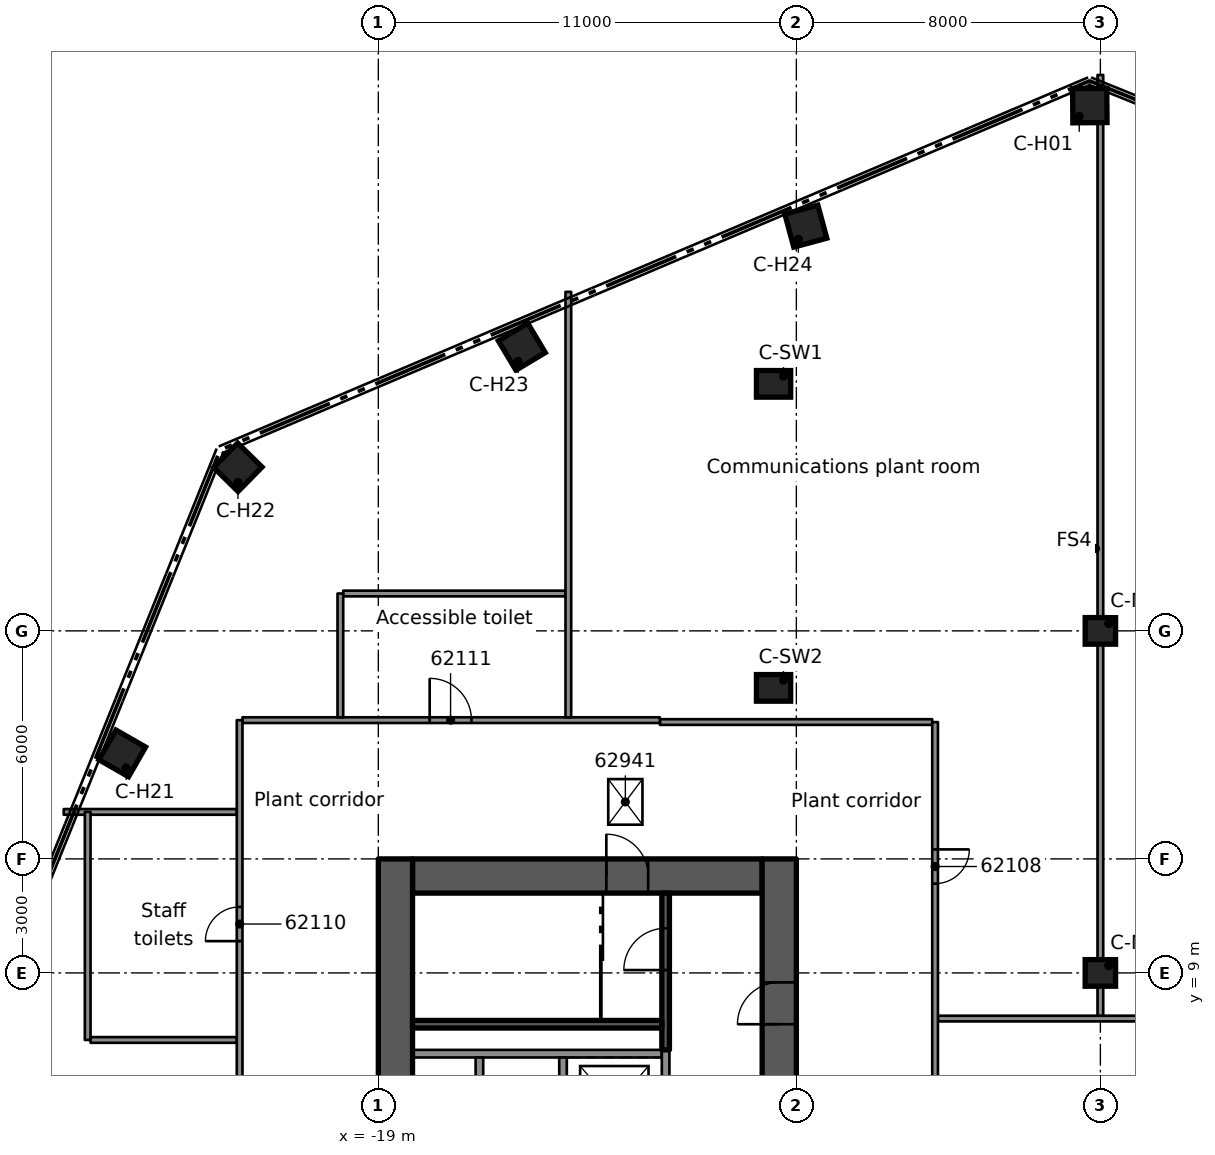
"""IFC4 building model, lengths in metres.
Left out: names, types, materials, properties, quantities, classifications, styles, units other than length and angle.
Written with IfcOpenShell. Run it as: python <this file> out.ifc"""

import sys

from ifc_helpers import new_model, si_unit, direction, frame, frame_2d, origin, origin_2d, place, context, subcontext, project, spatial, rectangle, extrude, element, fill, save


model = new_model("IFC4")
c1 = context("Model", 3, precision=1e-05, world=origin(), true_north=direction((0.0, 1.0)))
c2 = subcontext(c1, "Body", "Model", "MODEL_VIEW")
j1 = project(units=[si_unit("LENGTHUNIT", "METRE"), si_unit("PLANEANGLEUNIT", "RADIAN")], contexts=[c1])
p1 = place(None, origin())
s1 = spatial("IfcSite", under=j1, at=p1, CompositionType="ELEMENT")
p2 = place(p1, origin())
s2 = spatial("IfcBuilding", under=s1, at=p2, CompositionType="ELEMENT")
p3 = place(p2, frame((0.0, 0.0, 299.9)))
s3 = spatial("IfcBuildingStorey", under=s2, at=p3, CompositionType="ELEMENT", Elevation=299.9)
p4 = place(p3, frame((-18.1, 11.55, 0.0), z_axis=(0.0, 0.0, 1.0), x_axis=(1.0, 0.0, 0.0)))
e1 = element("IfcWall", 1, at=p4, inside=s3, PredefinedType="SHEAR", context=c2, shape_type="SweptSolid", body=[
    extrude(rectangle(XDim=9.2, YDim=0.9, at=frame_2d((4.6, 0.0))), origin(), (0.0, 0.0, 1.0), 4.4),
])
p5 = place(p4, frame((5.1, 0.0, 0.0)))
e2 = element("IfcOpeningElement", 2, at=p5, cuts=e1, PredefinedType="OPENING", context=c2, shape_type="SweptSolid", body=[
    extrude(rectangle(XDim=1.1, YDim=2.1, at=frame_2d((0.55, 1.05))), frame((0.0, 0.46, 0.0), z_axis=(0.0, -1.0, 0.0), x_axis=(1.0, 0.0, 0.0)), (0.0, 0.0, 1.0), 0.92),
])
p6 = place(p3, frame((-18.55, -12.0, 0.0), z_axis=(0.0, 0.0, 1.0), x_axis=(0.0, 1.0, 0.0)))
e3 = element("IfcWall", 3, at=p6, inside=s3, PredefinedType="SHEAR", context=c2, shape_type="SweptSolid", body=[
    extrude(rectangle(XDim=24.0, YDim=0.9, at=frame_2d((12.0, 0.0))), origin(), (0.0, 0.0, 1.0), 4.4),
])
p7 = place(p6, frame((5.9, 0.0, 0.0)))
e4 = element("IfcOpeningElement", 4, at=p7, cuts=e3, PredefinedType="OPENING", context=c2, shape_type="SweptSolid", body=[
    extrude(rectangle(XDim=1.8, YDim=2.1, at=frame_2d((0.9, 1.05))), frame((0.0, 0.46, 0.0), z_axis=(0.0, -1.0, 0.0), x_axis=(1.0, 0.0, 0.0)), (0.0, 0.0, 1.0), 0.92),
])
p8 = place(p6, frame((10.1, 0.0, 0.0)))
e5 = element("IfcOpeningElement", 5, at=p8, cuts=e3, PredefinedType="OPENING", context=c2, shape_type="SweptSolid", body=[
    extrude(rectangle(XDim=1.8, YDim=2.1, at=frame_2d((0.9, 1.05))), frame((0.0, 0.46, 0.0), z_axis=(0.0, -1.0, 0.0), x_axis=(1.0, 0.0, 0.0)), (0.0, 0.0, 1.0), 0.92),
])
p9 = place(p6, frame((14.3, 0.0, 0.0)))
e6 = element("IfcOpeningElement", 6, at=p9, cuts=e3, PredefinedType="OPENING", context=c2, shape_type="SweptSolid", body=[
    extrude(rectangle(XDim=1.8, YDim=2.1, at=frame_2d((0.9, 1.05))), frame((0.0, 0.46, 0.0), z_axis=(0.0, -1.0, 0.0), x_axis=(1.0, 0.0, 0.0)), (0.0, 0.0, 1.0), 0.92),
])
p10 = place(p3, frame((-8.45, -12.0, 0.0), z_axis=(0.0, 0.0, 1.0), x_axis=(0.0, 1.0, 0.0)))
e7 = element("IfcWall", 7, at=p10, inside=s3, PredefinedType="SHEAR", context=c2, shape_type="SweptSolid", body=[
    extrude(rectangle(XDim=24.0, YDim=0.9, at=frame_2d((12.0, 0.0))), origin(), (0.0, 0.0, 1.0), 4.4),
])
p11 = place(p10, frame((9.6, 0.0, 0.0)))
e8 = element("IfcOpeningElement", 8, at=p11, cuts=e7, PredefinedType="OPENING", context=c2, shape_type="SweptSolid", body=[
    extrude(rectangle(XDim=1.8, YDim=2.1, at=frame_2d((0.9, 1.05))), frame((0.0, 0.46, 0.0), z_axis=(0.0, -1.0, 0.0), x_axis=(1.0, 0.0, 0.0)), (0.0, 0.0, 1.0), 0.92),
])
p12 = place(p10, frame((5.9, 0.0, 0.0)))
e9 = element("IfcOpeningElement", 9, at=p12, cuts=e7, PredefinedType="OPENING", context=c2, shape_type="SweptSolid", body=[
    extrude(rectangle(XDim=1.8, YDim=2.1, at=frame_2d((0.9, 1.05))), frame((0.0, 0.46, 0.0), z_axis=(0.0, -1.0, 0.0), x_axis=(1.0, 0.0, 0.0)), (0.0, 0.0, 1.0), 0.92),
])
p13 = place(p10, frame((12.6, 0.0, 0.0)))
e10 = element("IfcOpeningElement", 10, at=p13, cuts=e7, PredefinedType="OPENING", context=c2, shape_type="SweptSolid", body=[
    extrude(rectangle(XDim=1.8, YDim=2.1, at=frame_2d((0.9, 1.05))), frame((0.0, 0.46, 0.0), z_axis=(0.0, -1.0, 0.0), x_axis=(1.0, 0.0, 0.0)), (0.0, 0.0, 1.0), 0.92),
])
p14 = place(p10, frame((19.65, 0.0, 0.0)))
e11 = element("IfcOpeningElement", 11, at=p14, cuts=e7, PredefinedType="OPENING", context=c2, shape_type="SweptSolid", body=[
    extrude(rectangle(XDim=1.1, YDim=2.1, at=frame_2d((0.55, 1.05))), frame((0.0, 0.46, 0.0), z_axis=(0.0, -1.0, 0.0), x_axis=(1.0, 0.0, 0.0)), (0.0, 0.0, 1.0), 0.92),
])
for number, where, z_axis, x_axis in (
    (12, (-0.278, 31.821, 0.0), (0.0, 0.0, 1.0), (-0.009, 1.0, 0.0)),
    (13, (-25.739, 14.777, 0.0), (0.0, 0.0, 1.0), (-0.867, 0.498, 0.0)),
    (14, (-22.697, 22.305, 0.0), (0.0, 0.0, 1.0), (-0.713, 0.701, 0.0)),
    (15, (-15.224, 25.477, 0.0), (0.0, 0.0, 1.0), (-0.513, 0.858, 0.0)),
    (16, (-7.751, 28.649, 0.0), (0.0, 0.0, 1.0), (-0.261, 0.965, 0.0)),
):
    element("IfcColumn", number, at=place(p3, frame(where, z_axis=z_axis, x_axis=x_axis)), inside=s3, PredefinedType="COLUMN", context=c2, shape_type="SweptSolid", body=[
        extrude(rectangle(XDim=0.9, YDim=0.9, at=origin_2d()), origin(), (0.0, 0.0, 1.0), 4.4),
    ])
for number, where, z_axis, x_axis in (
    (17, (0.0, 9.0, 0.0), (0.0, 0.0, 1.0), (1.0, 0.0, 0.0)),
    (18, (0.0, 18.0, 0.0), (0.0, 0.0, 1.0), (1.0, 0.0, 0.0)),
):
    element("IfcColumn", number, at=place(p3, frame(where, z_axis=z_axis, x_axis=x_axis)), inside=s3, PredefinedType="COLUMN", context=c2, shape_type="SweptSolid", body=[
        extrude(rectangle(XDim=0.8, YDim=0.7, at=origin_2d()), origin(), (0.0, 0.0, 1.0), 4.4),
    ])
for number, where, z_axis, x_axis in (
    (19, (-8.6, 24.5, 0.0), (0.0, 0.0, 1.0), (1.0, 0.0, 0.0)),
    (20, (-8.6, 16.5, 0.0), (0.0, 0.0, 1.0), (1.0, 0.0, 0.0)),
):
    element("IfcColumn", number, at=place(p3, frame(where, z_axis=z_axis, x_axis=x_axis)), inside=s3, PredefinedType="COLUMN", context=c2, shape_type="SweptSolid", body=[
        extrude(rectangle(XDim=0.9, YDim=0.7, at=origin_2d()), origin(), (0.0, 0.0, 1.0), 4.4),
    ])
p15 = place(p3, frame((-11.54, 6.875, 0.0), z_axis=(0.0, 0.0, 1.0), x_axis=(-1.0, 0.0, 0.0)))
e21 = element("IfcWall", 21, at=p15, inside=s3, PredefinedType="SOLIDWALL", context=c2, shape_type="SweptSolid", body=[
    extrude(rectangle(XDim=6.56, YDim=0.2, at=frame_2d((3.28, 0.0))), origin(), (0.0, 0.0, 1.0), 3.98),
])
p16 = place(p3, frame((-11.44, -6.975, 0.0), z_axis=(0.0, 0.0, 1.0), x_axis=(0.0, 1.0, 0.0)))
e22 = element("IfcWall", 22, at=p16, inside=s3, PredefinedType="SOLIDWALL", context=c2, shape_type="SweptSolid", body=[
    extrude(rectangle(XDim=13.95, YDim=0.2, at=frame_2d((6.975, 0.0))), origin(), (0.0, 0.0, 1.0), 3.98),
])
p17 = place(p16, frame((11.925, 0.0, 0.0)))
e23 = element("IfcOpeningElement", 23, at=p17, cuts=e22, PredefinedType="OPENING", context=c2, shape_type="SweptSolid", body=[
    extrude(rectangle(XDim=1.1, YDim=2.1, at=frame_2d((0.55, 1.05))), frame((0.0, 0.11, 0.0), z_axis=(0.0, -1.0, 0.0), x_axis=(1.0, 0.0, 0.0)), (0.0, 0.0, 1.0), 0.22),
])
p18 = place(p16, frame((1.075, 0.0, 0.0)))
e24 = element("IfcOpeningElement", 24, at=p18, cuts=e22, PredefinedType="OPENING", context=c2, shape_type="SweptSolid", body=[
    extrude(rectangle(XDim=0.8, YDim=2.1, at=frame_2d((0.4, 1.05))), frame((0.0, 0.11, 0.0), z_axis=(0.0, -1.0, 0.0), x_axis=(1.0, 0.0, 0.0)), (0.0, 0.0, 1.0), 0.22),
])
p19 = place(p16, frame((9.325, 0.0, 0.0)))
e25 = element("IfcOpeningElement", 25, at=p19, cuts=e22, PredefinedType="OPENING", context=c2, shape_type="SweptSolid", body=[
    extrude(rectangle(XDim=0.8, YDim=2.1, at=frame_2d((0.4, 1.05))), frame((0.0, 0.11, 0.0), z_axis=(0.0, -1.0, 0.0), x_axis=(1.0, 0.0, 0.0)), (0.0, 0.0, 1.0), 0.22),
])
for number, where, z_axis, x_axis in (
    (26, (-14.14, 4.025, 0.0), (0.0, 0.0, 1.0), (0.0, 1.0, 0.0)),
    (27, (-16.34, 4.025, 0.0), (0.0, 0.0, 1.0), (0.0, 1.0, 0.0)),
):
    element("IfcWall", number, at=place(p3, frame(where, z_axis=z_axis, x_axis=x_axis)), inside=s3, PredefinedType="SOLIDWALL", context=c2, shape_type="SweptSolid", body=[
        extrude(rectangle(XDim=2.75, YDim=0.2, at=frame_2d((1.375, 0.0))), origin(), (0.0, 0.0, 1.0), 3.98),
    ])
p20 = place(p3, frame((-11.44, 6.975, 0.0), z_axis=(0.0, 0.0, 1.0), x_axis=(0.0, 1.0, 0.0)))
e28 = element("IfcWall", 28, at=p20, inside=s3, PredefinedType="SOLIDWALL", context=c2, shape_type="SweptSolid", body=[
    extrude(rectangle(XDim=4.125, YDim=0.2, at=frame_2d((2.062, 0.0))), origin(), (0.0, 0.0, 1.0), 3.98),
])
p21 = place(p20, frame((2.1, 0.0, 0.0)))
e29 = element("IfcOpeningElement", 29, at=p21, cuts=e28, PredefinedType="OPENING", context=c2, shape_type="SweptSolid", body=[
    extrude(rectangle(XDim=1.1, YDim=2.1, at=frame_2d((0.55, 1.05))), frame((0.0, 0.11, 0.0), z_axis=(0.0, -1.0, 0.0), x_axis=(1.0, 0.0, 0.0)), (0.0, 0.0, 1.0), 0.22),
])
p22 = place(p3, frame((-11.54, 7.65, 0.0), z_axis=(0.0, 0.0, 1.0), x_axis=(-1.0, 0.0, 0.0)))
e30 = element("IfcWall", 30, at=p22, inside=s3, PredefinedType="SOLIDWALL", context=c2, shape_type="SweptSolid", body=[
    extrude(rectangle(XDim=6.56, YDim=0.2, at=frame_2d((3.28, 0.0))), origin(), (0.0, 0.0, 1.0), 3.98),
])
p23 = place(p3, frame((-26.573, 7.236, 0.0), z_axis=(0.0, 0.0, 1.0), x_axis=(1.0, 0.0, 0.0)))
e31 = element("IfcWall", 31, at=p23, inside=s3, PredefinedType="PARTITIONING", context=c2, shape_type="SweptSolid", body=[
    extrude(rectangle(XDim=3.848, YDim=0.15, at=frame_2d((1.924, 0.0))), origin(), (0.0, 0.0, 1.0), 3.98),
])
p24 = place(p3, frame((-4.274, 7.799, 0.0), z_axis=(0.0, 0.0, 1.0), x_axis=(1.0, 0.0, 0.0)))
e32 = element("IfcWall", 32, at=p24, inside=s3, PredefinedType="PARTITIONING", context=c2, shape_type="SweptSolid", body=[
    extrude(rectangle(XDim=8.549, YDim=0.15, at=frame_2d((4.274, 0.0))), origin(), (0.0, 0.0, 1.0), 3.98),
])
p25 = place(p3, frame((-27.278, 13.237, 0.0), z_axis=(0.0, 0.0, 1.0), x_axis=(1.0, 0.0, 0.0)))
e33 = element("IfcWall", 33, at=p25, inside=s3, PredefinedType="PARTITIONING", context=c2, shape_type="SweptSolid", body=[
    extrude(rectangle(XDim=4.553, YDim=0.15, at=frame_2d((2.276, 0.0))), origin(), (0.0, 0.0, 1.0), 3.98),
])
p26 = place(p3, frame((-11.59, 15.601, 0.0), z_axis=(0.0, 0.0, 1.0), x_axis=(1.0, 0.0, 0.0)))
e34 = element("IfcWall", 34, at=p26, inside=s3, PredefinedType="PARTITIONING", context=c2, shape_type="SweptSolid", body=[
    extrude(rectangle(XDim=7.165, YDim=0.15, at=frame_2d((3.583, 0.0))), origin(), (0.0, 0.0, 1.0), 3.98),
])
p27 = place(p3, frame((-22.575, 15.651, 0.0), z_axis=(0.0, 0.0, 1.0), x_axis=(1.0, 0.0, 0.0)))
e35 = element("IfcWall", 35, at=p27, inside=s3, PredefinedType="PARTITIONING", context=c2, shape_type="SweptSolid", body=[
    extrude(rectangle(XDim=10.984, YDim=0.15, at=frame_2d((5.492, 0.0))), origin(), (0.0, 0.0, 1.0), 3.98),
])
p28 = place(p27, frame((4.926, 0.0, 0.0)))
e36 = element("IfcOpeningElement", 36, at=p28, cuts=e35, PredefinedType="OPENING", context=c2, shape_type="SweptSolid", body=[
    extrude(rectangle(XDim=1.1, YDim=2.1, at=frame_2d((0.55, 1.05))), frame((0.0, 0.085, 0.0), z_axis=(0.0, -1.0, 0.0), x_axis=(1.0, 0.0, 0.0)), (0.0, 0.0, 1.0), 0.17),
])
p29 = place(p3, frame((-19.924, 18.983, 0.0), z_axis=(0.0, 0.0, 1.0), x_axis=(1.0, 0.0, 0.0)))
e37 = element("IfcWall", 37, at=p29, inside=s3, PredefinedType="PARTITIONING", context=c2, shape_type="SweptSolid", body=[
    extrude(rectangle(XDim=5.849, YDim=0.15, at=frame_2d((2.925, 0.0))), origin(), (0.0, 0.0, 1.0), 3.98),
])
p30 = place(p3, frame((0.0, 7.874, 0.0), z_axis=(0.0, 0.0, 1.0), x_axis=(0.0, 1.0, 0.0)))
e38 = element("IfcWall", 38, at=p30, inside=s3, PredefinedType="PARTITIONING", context=c2, shape_type="SweptSolid", body=[
    extrude(rectangle(XDim=24.753, YDim=0.15, at=frame_2d((12.376, 0.0))), origin(), (0.0, 0.0, 1.0), 3.98),
])
p31 = place(p3, frame((-4.349, 15.6, 0.0), z_axis=(0.0, 0.0, 1.0), x_axis=(0.0, -1.0, 0.0)))
e39 = element("IfcWall", 39, at=p31, inside=s3, PredefinedType="PARTITIONING", context=c2, shape_type="SweptSolid", body=[
    extrude(rectangle(XDim=31.2, YDim=0.15, at=frame_2d((15.6, 0.0))), origin(), (0.0, 0.0, 1.0), 3.98),
])
p32 = place(p31, frame((18.95, 0.0, 0.0)))
e40 = element("IfcOpeningElement", 40, at=p32, cuts=e39, PredefinedType="OPENING", context=c2, shape_type="SweptSolid", body=[
    extrude(rectangle(XDim=0.9, YDim=2.1, at=frame_2d((0.45, 1.05))), frame((0.0, 0.085, 0.0), z_axis=(0.0, -1.0, 0.0), x_axis=(1.0, 0.0, 0.0)), (0.0, 0.0, 1.0), 0.17),
])
p33 = place(p31, frame((11.151, 0.0, 0.0)))
e41 = element("IfcOpeningElement", 41, at=p33, cuts=e39, PredefinedType="OPENING", context=c2, shape_type="SweptSolid", body=[
    extrude(rectangle(XDim=0.9, YDim=2.1, at=frame_2d((0.45, 1.05))), frame((0.0, 0.085, 0.0), z_axis=(0.0, -1.0, 0.0), x_axis=(1.0, 0.0, 0.0)), (0.0, 0.0, 1.0), 0.17),
])
p34 = place(p31, frame((3.35, 0.0, 0.0)))
e42 = element("IfcOpeningElement", 42, at=p34, cuts=e39, PredefinedType="OPENING", context=c2, shape_type="SweptSolid", body=[
    extrude(rectangle(XDim=0.9, YDim=2.1, at=frame_2d((0.45, 1.05))), frame((0.0, 0.085, 0.0), z_axis=(0.0, -1.0, 0.0), x_axis=(1.0, 0.0, 0.0)), (0.0, 0.0, 1.0), 0.17),
])
p35 = place(p3, frame((-14.0, 15.726, 0.0), z_axis=(0.0, 0.0, 1.0), x_axis=(0.0, 1.0, 0.0)))
e43 = element("IfcWall", 43, at=p35, inside=s3, PredefinedType="PARTITIONING", context=c2, shape_type="SweptSolid", body=[
    extrude(rectangle(XDim=11.194, YDim=0.15, at=frame_2d((5.597, 0.0))), origin(), (0.0, 0.0, 1.0), 3.98),
])
p36 = place(p3, frame((-19.999, 15.726, 0.0), z_axis=(0.0, 0.0, 1.0), x_axis=(0.0, 1.0, 0.0)))
e44 = element("IfcWall", 44, at=p36, inside=s3, PredefinedType="PARTITIONING", context=c2, shape_type="SweptSolid", body=[
    extrude(rectangle(XDim=3.257, YDim=0.15, at=frame_2d((1.628, 0.0))), origin(), (0.0, 0.0, 1.0), 3.98),
])
p37 = place(p3, frame((-22.65, -15.651, 0.0), z_axis=(0.0, 0.0, 1.0), x_axis=(0.0, 1.0, 0.0)))
e45 = element("IfcWall", 45, at=p37, inside=s3, PredefinedType="PARTITIONING", context=c2, shape_type="SweptSolid", body=[
    extrude(rectangle(XDim=31.302, YDim=0.15, at=frame_2d((15.651, 0.0))), origin(), (0.0, 0.0, 1.0), 3.98),
])
p38 = place(p37, frame((7.35, 0.0, 0.0)))
e46 = element("IfcOpeningElement", 46, at=p38, cuts=e45, PredefinedType="OPENING", context=c2, shape_type="SweptSolid", body=[
    extrude(rectangle(XDim=0.9, YDim=2.1, at=frame_2d((0.45, 1.05))), frame((0.0, 0.085, 0.0), z_axis=(0.0, -1.0, 0.0), x_axis=(1.0, 0.0, 0.0)), (0.0, 0.0, 1.0), 0.17),
])
p39 = place(p37, frame((18.751, 0.0, 0.0)))
e47 = element("IfcOpeningElement", 47, at=p39, cuts=e45, PredefinedType="OPENING", context=c2, shape_type="SweptSolid", body=[
    extrude(rectangle(XDim=0.9, YDim=2.1, at=frame_2d((0.45, 1.05))), frame((0.0, 0.085, 0.0), z_axis=(0.0, -1.0, 0.0), x_axis=(1.0, 0.0, 0.0)), (0.0, 0.0, 1.0), 0.17),
])
p40 = place(p37, frame((25.488, 0.0, 0.0)))
e48 = element("IfcOpeningElement", 48, at=p40, cuts=e45, PredefinedType="OPENING", context=c2, shape_type="SweptSolid", body=[
    extrude(rectangle(XDim=0.9, YDim=2.1, at=frame_2d((0.45, 1.05))), frame((0.0, 0.085, 0.0), z_axis=(0.0, -1.0, 0.0), x_axis=(1.0, 0.0, 0.0)), (0.0, 0.0, 1.0), 0.17),
])
p41 = place(p3, frame((-26.648, 7.236, 0.0), z_axis=(0.0, 0.0, 1.0), x_axis=(0.0, 1.0, 0.0)))
e49 = element("IfcWall", 49, at=p41, inside=s3, PredefinedType="PARTITIONING", context=c2, shape_type="SweptSolid", body=[
    extrude(rectangle(XDim=6.001, YDim=0.15, at=frame_2d((3.0, 0.0))), origin(), (0.0, 0.0, 1.0), 3.98),
])
p42 = place(p14, origin())
e50 = element("IfcDoor", 50, at=p42, inside=s3, OperationType="SINGLE_SWING_RIGHT", PredefinedType="DOOR", context=c2, shape_type="SweptSolid", body=[
    extrude(rectangle(XDim=1.1, YDim=2.1, at=frame_2d((0.55, 1.05))), frame((0.0, 0.025, 0.0), z_axis=(0.0, -1.0, 0.0), x_axis=(1.0, 0.0, 0.0)), (0.0, 0.0, 1.0), 0.05),
])
fill(e11, e50)
p43 = place(p5, origin())
e51 = element("IfcDoor", 51, at=p43, inside=s3, OperationType="SINGLE_SWING_RIGHT", PredefinedType="DOOR", context=c2, shape_type="SweptSolid", body=[
    extrude(rectangle(XDim=1.1, YDim=2.1, at=frame_2d((0.55, 1.05))), frame((0.0, 0.025, 0.0), z_axis=(0.0, -1.0, 0.0), x_axis=(1.0, 0.0, 0.0)), (0.0, 0.0, 1.0), 0.05),
])
fill(e2, e51)
p44 = place(p21, origin())
e52 = element("IfcDoor", 52, at=p44, inside=s3, OperationType="SINGLE_SWING_RIGHT", PredefinedType="DOOR", context=c2, shape_type="SweptSolid", body=[
    extrude(rectangle(XDim=1.1, YDim=2.1, at=frame_2d((0.55, 1.05))), frame((0.0, 0.025, 0.0), z_axis=(0.0, -1.0, 0.0), x_axis=(1.0, 0.0, 0.0)), (0.0, 0.0, 1.0), 0.05),
])
fill(e29, e52)
p45 = place(p2, frame((0.0, 0.0, 304.3)))
p46 = place(p45, frame((0.0, 0.0, -0.42)))
p47 = place(p46, frame((-12.5, 13.5, 0.0)))
p48 = place(p47, origin())
e53 = element("IfcDoor", 53, at=p48, inside=s3, OperationType="SINGLE_SWING_LEFT", PredefinedType="TRAPDOOR", context=c2, shape_type="SweptSolid", body=[
    extrude(rectangle(XDim=0.9, YDim=1.2, at=origin_2d()), origin(), (0.0, 0.0, 1.0), 0.42),
])
p49 = place(p34, origin())
e54 = element("IfcDoor", 54, at=p49, inside=s3, OperationType="SINGLE_SWING_LEFT", PredefinedType="DOOR", context=c2, shape_type="SweptSolid", body=[
    extrude(rectangle(XDim=0.9, YDim=2.1, at=frame_2d((0.45, 1.05))), frame((0.0, 0.025, 0.0), z_axis=(0.0, -1.0, 0.0), x_axis=(1.0, 0.0, 0.0)), (0.0, 0.0, 1.0), 0.05),
])
fill(e42, e54)
p50 = place(p40, origin())
e55 = element("IfcDoor", 55, at=p50, inside=s3, OperationType="SINGLE_SWING_RIGHT", PredefinedType="DOOR", context=c2, shape_type="SweptSolid", body=[
    extrude(rectangle(XDim=0.9, YDim=2.1, at=frame_2d((0.45, 1.05))), frame((0.0, 0.025, 0.0), z_axis=(0.0, -1.0, 0.0), x_axis=(1.0, 0.0, 0.0)), (0.0, 0.0, 1.0), 0.05),
])
fill(e48, e55)
p51 = place(p28, origin())
e56 = element("IfcDoor", 56, at=p51, inside=s3, OperationType="SINGLE_SWING_LEFT", PredefinedType="DOOR", context=c2, shape_type="SweptSolid", body=[
    extrude(rectangle(XDim=1.1, YDim=2.1, at=frame_2d((0.55, 1.05))), frame((0.0, 0.025, 0.0), z_axis=(0.0, -1.0, 0.0), x_axis=(1.0, 0.0, 0.0)), (0.0, 0.0, 1.0), 0.05),
])
fill(e36, e56)
save(model, sys.argv[1])
